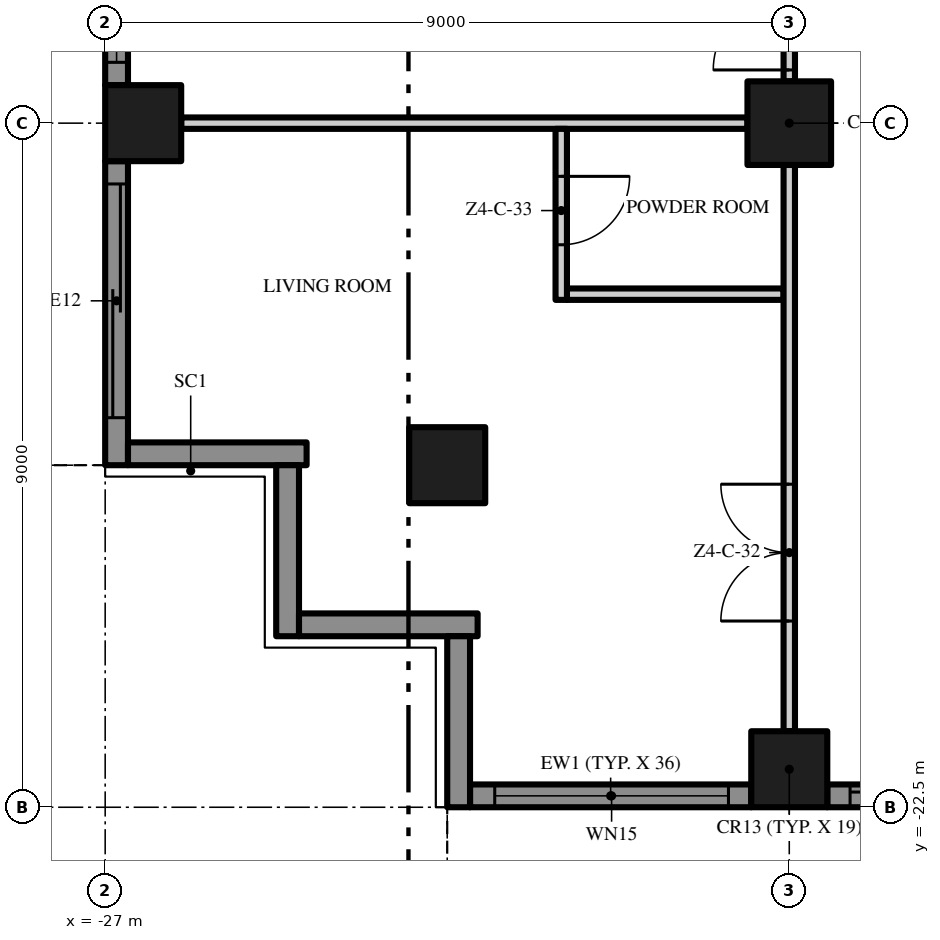
"""IFC4 building model, lengths in metres.
Left out: names, types, materials, properties, quantities, classifications, styles, units other than length and angle.
Written with IfcOpenShell. Run it as: python <this file> out.ifc"""

import sys

from ifc_helpers import new_model, si_unit, direction, frame, frame_2d, origin, origin_2d, place, context, subcontext, project, spatial, polyline, rectangle, outline, extrude, element, fill, save


model = new_model("IFC4")
c1 = context("Model", 3, precision=1e-05, world=origin(), true_north=direction((0.0, 1.0)))
c2 = subcontext(c1, "Body", "Model", "MODEL_VIEW")
j1 = project(units=[si_unit("LENGTHUNIT", "METRE"), si_unit("PLANEANGLEUNIT", "RADIAN")], contexts=[c1])
p1 = place(None, origin())
s1 = spatial("IfcSite", under=j1, at=p1, CompositionType="ELEMENT")
p2 = place(p1, origin())
s2 = spatial("IfcBuilding", under=s1, at=p2, CompositionType="ELEMENT")
p3 = place(p2, frame((0.0, 0.0, 207.2)))
s3 = spatial("IfcBuildingStorey", under=s2, at=p3, CompositionType="ELEMENT", Elevation=207.2)
p4 = place(p3, frame((-18.0, -13.5, 0.0), z_axis=(0.0, 0.0, 1.0), x_axis=(1.0, 0.0, 0.0)))
e1 = element("IfcColumn", 1, at=p4, inside=s3, PredefinedType="COLUMN", context=c2, shape_type="SweptSolid", body=[
    extrude(rectangle(XDim=1.1, YDim=1.1, at=origin_2d()), origin(), (0.0, 0.0, 1.0), 3.5),
])
for number, where, z_axis, x_axis in (
    (2, (-18.0, -22.0, 0.0), (0.0, 0.0, 1.0), (1.0, 0.0, 0.0)),
    (3, (-26.5, -13.5, 0.0), (0.0, 0.0, 1.0), (1.0, 0.0, 0.0)),
    (4, (-22.5, -18.0, 0.0), (0.0, 0.0, 1.0), (1.0, 0.0, 0.0)),
):
    element("IfcColumn", number, at=place(p3, frame(where, z_axis=z_axis, x_axis=x_axis)), inside=s3, PredefinedType="COLUMN", context=c2, shape_type="SweptSolid", body=[
        extrude(rectangle(XDim=1.0, YDim=1.0, at=origin_2d()), origin(), (0.0, 0.0, 1.0), 3.5),
    ])
p5 = place(p3, frame((-18.5, -22.35, 0.0), z_axis=(0.0, 0.0, 1.0), x_axis=(-1.0, 0.0, 0.0)))
e5 = element("IfcWall", 5, at=p5, inside=s3, PredefinedType="SOLIDWALL", context=c2, shape_type="SweptSolid", body=[
    extrude(rectangle(XDim=3.7, YDim=0.3, at=frame_2d((1.85, 0.0))), origin(), (0.0, 0.0, 1.0), 3.5),
])
p6 = place(p5, frame((0.3, 0.0, 0.45)))
e6 = element("IfcOpeningElement", 6, at=p6, cuts=e5, PredefinedType="OPENING", context=c2, shape_type="SweptSolid", body=[
    extrude(rectangle(XDim=3.075, YDim=2.65, at=frame_2d((1.538, 1.325))), frame((0.0, 0.16, 0.0), z_axis=(0.0, -1.0, 0.0), x_axis=(1.0, 0.0, 0.0)), (0.0, 0.0, 1.0), 0.32),
])
p7 = place(p3, frame((-9.5, -22.35, 0.0), z_axis=(0.0, 0.0, 1.0), x_axis=(-1.0, 0.0, 0.0)))
e7 = element("IfcWall", 7, at=p7, inside=s3, PredefinedType="SOLIDWALL", context=c2, shape_type="SweptSolid", body=[
    extrude(rectangle(XDim=8.0, YDim=0.3, at=frame_2d((4.0, 0.0))), origin(), (0.0, 0.0, 1.0), 3.5),
])
p8 = place(p7, frame((4.625, 0.0, 0.0)))
e8 = element("IfcOpeningElement", 8, at=p8, cuts=e7, PredefinedType="OPENING", context=c2, shape_type="SweptSolid", body=[
    extrude(rectangle(XDim=3.075, YDim=2.4, at=frame_2d((1.538, 1.2))), frame((0.0, 0.16, 0.0), z_axis=(0.0, -1.0, 0.0), x_axis=(1.0, 0.0, 0.0)), (0.0, 0.0, 1.0), 0.32),
])
p9 = place(p7, frame((0.3, 0.0, 0.45)))
e9 = element("IfcOpeningElement", 9, at=p9, cuts=e7, PredefinedType="OPENING", context=c2, shape_type="SweptSolid", body=[
    extrude(rectangle(XDim=3.075, YDim=2.65, at=frame_2d((1.538, 1.325))), frame((0.0, 0.16, 0.0), z_axis=(0.0, -1.0, 0.0), x_axis=(1.0, 0.0, 0.0)), (0.0, 0.0, 1.0), 0.32),
])
p10 = place(p3, frame((-26.85, -13.0, 0.0), z_axis=(0.0, 0.0, 1.0), x_axis=(0.0, 1.0, 0.0)))
e10 = element("IfcWall", 10, at=p10, inside=s3, PredefinedType="SOLIDWALL", context=c2, shape_type="SweptSolid", body=[
    extrude(rectangle(XDim=8.0, YDim=0.3, at=frame_2d((4.0, 0.0))), origin(), (0.0, 0.0, 1.0), 3.5),
])
p11 = place(p10, frame((4.625, 0.0, 0.45)))
e11 = element("IfcOpeningElement", 11, at=p11, cuts=e10, PredefinedType="OPENING", context=c2, shape_type="SweptSolid", body=[
    extrude(rectangle(XDim=3.075, YDim=2.65, at=frame_2d((1.538, 1.325))), frame((0.0, 0.16, 0.0), z_axis=(0.0, -1.0, 0.0), x_axis=(1.0, 0.0, 0.0)), (0.0, 0.0, 1.0), 0.32),
])
p12 = place(p10, frame((0.3, 0.0, 0.45)))
e12 = element("IfcOpeningElement", 12, at=p12, cuts=e10, PredefinedType="OPENING", context=c2, shape_type="SweptSolid", body=[
    extrude(rectangle(XDim=3.075, YDim=2.65, at=frame_2d((1.538, 1.325))), frame((0.0, 0.16, 0.0), z_axis=(0.0, -1.0, 0.0), x_axis=(1.0, 0.0, 0.0)), (0.0, 0.0, 1.0), 0.32),
])
p13 = place(p3, frame((-26.85, -18.0, 0.0), z_axis=(0.0, 0.0, 1.0), x_axis=(0.0, 1.0, 0.0)))
e13 = element("IfcWall", 13, at=p13, inside=s3, PredefinedType="SOLIDWALL", context=c2, shape_type="SweptSolid", body=[
    extrude(rectangle(XDim=4.0, YDim=0.3, at=frame_2d((2.0, 0.0))), origin(), (0.0, 0.0, 1.0), 3.5),
])
p14 = place(p13, frame((0.625, 0.0, 0.0)))
e14 = element("IfcOpeningElement", 14, at=p14, cuts=e13, PredefinedType="OPENING", context=c2, shape_type="SweptSolid", body=[
    extrude(rectangle(XDim=3.075, YDim=2.4, at=frame_2d((1.538, 1.2))), frame((0.0, 0.16, 0.0), z_axis=(0.0, -1.0, 0.0), x_axis=(1.0, 0.0, 0.0)), (0.0, 0.0, 1.0), 0.32),
])
p15 = place(p3, frame((-24.35, -17.85, 0.0), z_axis=(0.0, 0.0, 1.0), x_axis=(-1.0, 0.0, 0.0)))
e15 = element("IfcWall", 15, at=p15, inside=s3, PredefinedType="SOLIDWALL", context=c2, shape_type="SweptSolid", body=[
    extrude(rectangle(XDim=2.35, YDim=0.3, at=frame_2d((1.175, 0.0))), origin(), (0.0, 0.0, 1.0), 3.5),
])
p16 = place(p3, frame((-24.6, -20.25, 0.0), z_axis=(0.0, 0.0, 1.0), x_axis=(0.0, 1.0, 0.0)))
e16 = element("IfcWall", 16, at=p16, inside=s3, PredefinedType="SOLIDWALL", context=c2, shape_type="SweptSolid", body=[
    extrude(rectangle(XDim=2.25, YDim=0.3, at=frame_2d((1.125, 0.0))), origin(), (0.0, 0.0, 1.0), 3.5),
])
p17 = place(p3, frame((-22.1, -20.1, 0.0), z_axis=(0.0, 0.0, 1.0), x_axis=(-1.0, 0.0, 0.0)))
e17 = element("IfcWall", 17, at=p17, inside=s3, PredefinedType="SOLIDWALL", context=c2, shape_type="SweptSolid", body=[
    extrude(rectangle(XDim=2.35, YDim=0.3, at=frame_2d((1.175, 0.0))), origin(), (0.0, 0.0, 1.0), 3.5),
])
p18 = place(p3, frame((-22.35, -22.5, 0.0), z_axis=(0.0, 0.0, 1.0), x_axis=(0.0, 1.0, 0.0)))
e18 = element("IfcWall", 18, at=p18, inside=s3, PredefinedType="SOLIDWALL", context=c2, shape_type="SweptSolid", body=[
    extrude(rectangle(XDim=2.25, YDim=0.3, at=frame_2d((1.125, 0.0))), origin(), (0.0, 0.0, 1.0), 3.5),
])
p19 = place(p3, origin())
e19 = element("IfcWall", 19, at=p19, inside=s3, PredefinedType="USERDEFINED", context=c2, shape_type="SweptSolid", body=[
    extrude(outline(polyline([(-22.5, -23.451), (-21.0, -24.112), (-19.5, -24.845), (-18.0, -25.369), (-16.875, -25.5), (-16.5, -25.485), (-15.0, -25.149), (-13.5, -24.488), (-12.0, -23.755), (-10.5, -23.231), (-9.375, -23.1), (-9.0, -23.115), (-7.5, -23.451), (-6.0, -24.112), (-4.5, -24.845), (-3.0, -25.369), (-1.875, -25.5), (-1.5, -25.485), (0.0, -25.149), (1.5, -24.488), (3.0, -23.755), (4.5, -23.231), (5.625, -23.1), (6.0, -23.115), (7.5, -23.451), (9.0, -24.112), (10.5, -24.845), (12.0, -25.369), (13.125, -25.5), (13.5, -25.485), (15.0, -25.149), (16.5, -24.488), (18.0, -23.755), (19.5, -23.231), (20.625, -23.1), (21.0, -23.115), (22.5, -23.451), (22.555, -23.208), (21.033, -22.866), (20.615, -22.849), (19.444, -22.986), (17.904, -23.524), (16.395, -24.261), (14.921, -24.91), (13.467, -25.236), (13.135, -25.249), (12.056, -25.124), (10.596, -24.614), (9.105, -23.885), (7.579, -23.213), (6.033, -22.866), (5.615, -22.849), (4.444, -22.986), (2.904, -23.524), (1.395, -24.261), (-0.079, -24.91), (-1.533, -25.236), (-1.865, -25.249), (-2.944, -25.124), (-4.404, -24.614), (-5.895, -23.885), (-7.421, -23.213), (-8.967, -22.866), (-9.385, -22.849), (-10.556, -22.986), (-12.096, -23.524), (-13.605, -24.261), (-15.079, -24.91), (-16.533, -25.236), (-16.865, -25.249), (-17.944, -25.124), (-19.404, -24.614), (-20.895, -23.885), (-22.399, -23.223), (-22.5, -23.451)])), origin(), (0.0, 0.0, 1.0), 0.9),
])
p20 = place(p3, origin())
e20 = element("IfcWall", 20, at=p20, inside=s3, PredefinedType="USERDEFINED", context=c2, shape_type="SweptSolid", body=[
    extrude(outline(polyline([(-27.951, 18.0), (-28.612, 16.5), (-29.345, 15.0), (-29.869, 13.5), (-30.0, 12.375), (-29.985, 12.0), (-29.649, 10.5), (-28.988, 9.0), (-28.255, 7.5), (-27.731, 6.0), (-27.6, 4.875), (-27.615, 4.5), (-27.951, 3.0), (-28.612, 1.5), (-29.345, 0.0), (-29.869, -1.5), (-30.0, -2.625), (-29.985, -3.0), (-29.649, -4.5), (-28.988, -6.0), (-28.255, -7.5), (-27.731, -9.0), (-27.6, -10.125), (-27.615, -10.5), (-27.951, -12.0), (-28.612, -13.5), (-29.345, -15.0), (-29.869, -16.5), (-30.0, -17.625), (-29.985, -18.0), (-29.735, -17.99), (-29.749, -17.635), (-29.624, -16.556), (-29.114, -15.096), (-28.385, -13.605), (-27.713, -12.079), (-27.366, -10.533), (-27.349, -10.115), (-27.486, -8.944), (-28.024, -7.404), (-28.761, -5.895), (-29.41, -4.421), (-29.736, -2.967), (-29.749, -2.635), (-29.624, -1.556), (-29.114, -0.096), (-28.385, 1.395), (-27.713, 2.921), (-27.366, 4.467), (-27.349, 4.885), (-27.486, 6.056), (-28.024, 7.596), (-28.761, 9.105), (-29.41, 10.579), (-29.736, 12.033), (-29.749, 12.365), (-29.624, 13.444), (-29.114, 14.904), (-28.385, 16.395), (-27.723, 17.899), (-27.951, 18.0)])), origin(), (0.0, 0.0, 1.0), 0.9),
])
p21 = place(p3, frame((-20.925, -15.75, 0.0), z_axis=(0.0, 0.0, 1.0), x_axis=(1.0, 0.0, 0.0)))
e21 = element("IfcWall", 21, at=p21, inside=s3, PredefinedType="PARTITIONING", context=c2, shape_type="SweptSolid", body=[
    extrude(rectangle(XDim=2.85, YDim=0.15, at=frame_2d((1.425, 0.0))), origin(), (0.0, 0.0, 1.0), 3.5),
])
p22 = place(p3, frame((-26.0, -13.5, 0.0), z_axis=(0.0, 0.0, 1.0), x_axis=(1.0, 0.0, 0.0)))
e22 = element("IfcWall", 22, at=p22, inside=s3, PredefinedType="PARTITIONING", context=c2, shape_type="SweptSolid", body=[
    extrude(rectangle(XDim=7.45, YDim=0.15, at=frame_2d((3.725, 0.0))), origin(), (0.0, 0.0, 1.0), 3.5),
])
p23 = place(p3, frame((-21.0, -13.575, 0.0), z_axis=(0.0, 0.0, 1.0), x_axis=(0.0, -1.0, 0.0)))
e23 = element("IfcWall", 23, at=p23, inside=s3, PredefinedType="PARTITIONING", context=c2, shape_type="SweptSolid", body=[
    extrude(rectangle(XDim=2.25, YDim=0.15, at=frame_2d((1.125, 0.0))), origin(), (0.0, 0.0, 1.0), 3.5),
])
p24 = place(p23, frame((0.625, 0.0, 0.0)))
e24 = element("IfcOpeningElement", 24, at=p24, cuts=e23, PredefinedType="OPENING", context=c2, shape_type="SweptSolid", body=[
    extrude(rectangle(XDim=0.9, YDim=2.1, at=frame_2d((0.45, 1.05))), frame((0.0, 0.085, 0.0), z_axis=(0.0, -1.0, 0.0), x_axis=(1.0, 0.0, 0.0)), (0.0, 0.0, 1.0), 0.17),
])
p25 = place(p3, frame((-18.0, -21.5, 0.0), z_axis=(0.0, 0.0, 1.0), x_axis=(0.0, 1.0, 0.0)))
e25 = element("IfcWall", 25, at=p25, inside=s3, PredefinedType="PARTITIONING", context=c2, shape_type="SweptSolid", body=[
    extrude(rectangle(XDim=7.45, YDim=0.15, at=frame_2d((3.725, 0.0))), origin(), (0.0, 0.0, 1.0), 3.5),
])
p26 = place(p25, frame((1.45, 0.0, 0.0)))
e26 = element("IfcOpeningElement", 26, at=p26, cuts=e25, PredefinedType="OPENING", context=c2, shape_type="SweptSolid", body=[
    extrude(rectangle(XDim=1.8, YDim=2.4, at=frame_2d((0.9, 1.2))), frame((0.0, 0.085, 0.0), z_axis=(0.0, -1.0, 0.0), x_axis=(1.0, 0.0, 0.0)), (0.0, 0.0, 1.0), 0.17),
])
p27 = place(p3, frame((-18.0, -12.95, 0.0), z_axis=(0.0, 0.0, 1.0), x_axis=(0.0, 1.0, 0.0)))
e27 = element("IfcWall", 27, at=p27, inside=s3, PredefinedType="PARTITIONING", context=c2, shape_type="SweptSolid", body=[
    extrude(rectangle(XDim=7.9, YDim=0.15, at=frame_2d((3.95, 0.0))), origin(), (0.0, 0.0, 1.0), 3.5),
])
p28 = place(p27, frame((6.75, 0.0, 0.0)))
e28 = element("IfcOpeningElement", 28, at=p28, cuts=e27, PredefinedType="OPENING", context=c2, shape_type="SweptSolid", body=[
    extrude(rectangle(XDim=1.0, YDim=2.4, at=frame_2d((0.5, 1.2))), frame((0.0, 0.085, 0.0), z_axis=(0.0, -1.0, 0.0), x_axis=(1.0, 0.0, 0.0)), (0.0, 0.0, 1.0), 0.17),
])
p29 = place(p27, frame((0.15, 0.0, 0.0)))
e29 = element("IfcOpeningElement", 29, at=p29, cuts=e27, PredefinedType="OPENING", context=c2, shape_type="SweptSolid", body=[
    extrude(rectangle(XDim=1.0, YDim=2.4, at=frame_2d((0.5, 1.2))), frame((0.0, 0.085, 0.0), z_axis=(0.0, -1.0, 0.0), x_axis=(1.0, 0.0, 0.0)), (0.0, 0.0, 1.0), 0.17),
])
p30 = place(p6, origin())
e30 = element("IfcWindow", 30, at=p30, inside=s3, PartitioningType="SINGLE_PANEL", PredefinedType="WINDOW", context=c2, shape_type="SweptSolid", body=[
    extrude(rectangle(XDim=3.075, YDim=2.65, at=frame_2d((1.538, 1.325))), frame((0.0, 0.03, 0.0), z_axis=(0.0, -1.0, 0.0), x_axis=(1.0, 0.0, 0.0)), (0.0, 0.0, 1.0), 0.06),
])
fill(e6, e30)
p31 = place(p8, origin())
e31 = element("IfcDoor", 31, at=p31, inside=s3, OperationType="SINGLE_SWING_LEFT", PredefinedType="DOOR", context=c2, shape_type="SweptSolid", body=[
    extrude(rectangle(XDim=3.075, YDim=2.4, at=frame_2d((1.538, 1.2))), frame((0.0, 0.025, 0.0), z_axis=(0.0, -1.0, 0.0), x_axis=(1.0, 0.0, 0.0)), (0.0, 0.0, 1.0), 0.05),
])
fill(e8, e31)
p32 = place(p12, origin())
e32 = element("IfcWindow", 32, at=p32, inside=s3, PartitioningType="SINGLE_PANEL", PredefinedType="WINDOW", context=c2, shape_type="SweptSolid", body=[
    extrude(rectangle(XDim=3.075, YDim=2.65, at=frame_2d((1.538, 1.325))), frame((0.0, 0.03, 0.0), z_axis=(0.0, -1.0, 0.0), x_axis=(1.0, 0.0, 0.0)), (0.0, 0.0, 1.0), 0.06),
])
fill(e12, e32)
p33 = place(p14, origin())
e33 = element("IfcDoor", 33, at=p33, inside=s3, OperationType="SINGLE_SWING_LEFT", PredefinedType="DOOR", context=c2, shape_type="SweptSolid", body=[
    extrude(rectangle(XDim=3.075, YDim=2.4, at=frame_2d((1.538, 1.2))), frame((0.0, 0.025, 0.0), z_axis=(0.0, -1.0, 0.0), x_axis=(1.0, 0.0, 0.0)), (0.0, 0.0, 1.0), 0.05),
])
fill(e14, e33)
p34 = place(p29, origin())
e34 = element("IfcDoor", 34, at=p34, inside=s3, OperationType="SINGLE_SWING_LEFT", PredefinedType="DOOR", context=c2, shape_type="SweptSolid", body=[
    extrude(rectangle(XDim=1.0, YDim=2.4, at=frame_2d((0.5, 1.2))), frame((0.0, 0.025, 0.0), z_axis=(0.0, -1.0, 0.0), x_axis=(1.0, 0.0, 0.0)), (0.0, 0.0, 1.0), 0.05),
])
fill(e29, e34)
p35 = place(p26, origin())
e35 = element("IfcDoor", 35, at=p35, inside=s3, OperationType="DOUBLE_DOOR_SINGLE_SWING", PredefinedType="DOOR", context=c2, shape_type="SweptSolid", body=[
    extrude(rectangle(XDim=1.8, YDim=2.4, at=frame_2d((0.9, 1.2))), frame((0.0, 0.025, 0.0), z_axis=(0.0, -1.0, 0.0), x_axis=(1.0, 0.0, 0.0)), (0.0, 0.0, 1.0), 0.05),
])
fill(e26, e35)
p36 = place(p24, origin())
e36 = element("IfcDoor", 36, at=p36, inside=s3, OperationType="SINGLE_SWING_LEFT", PredefinedType="DOOR", context=c2, shape_type="SweptSolid", body=[
    extrude(rectangle(XDim=0.9, YDim=2.1, at=frame_2d((0.45, 1.05))), frame((0.0, 0.025, 0.0), z_axis=(0.0, -1.0, 0.0), x_axis=(1.0, 0.0, 0.0)), (0.0, 0.0, 1.0), 0.05),
])
fill(e24, e36)
save(model, sys.argv[1])
